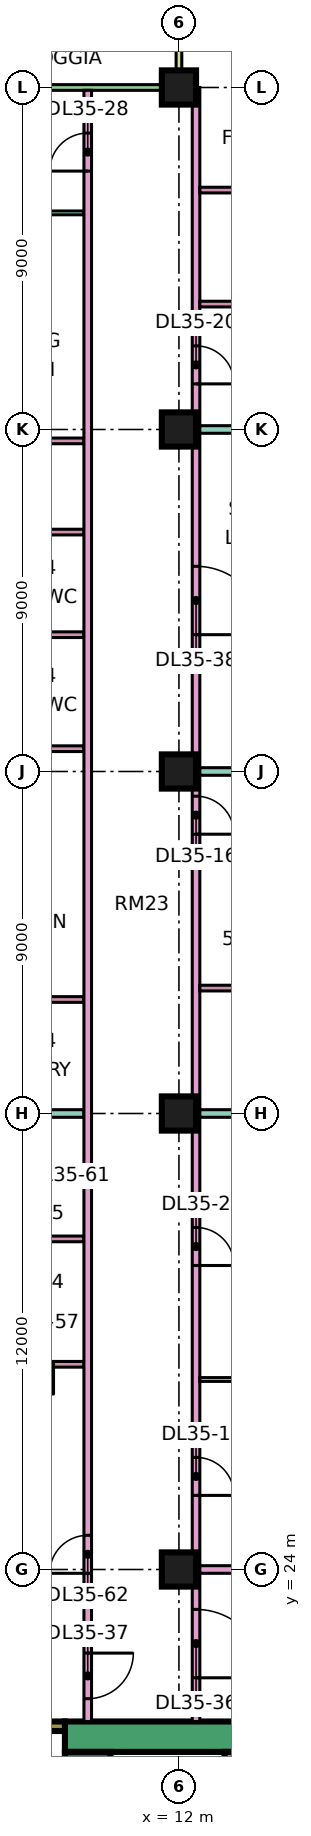
"""IFC4 building model, lengths in metres.
Left out: names, types, materials, properties, quantities, classifications, styles, units other than length and angle.
Written with IfcOpenShell. Run it as: python <this file> out.ifc"""

import sys

from ifc_helpers import new_model, si_unit, direction, frame, frame_2d, origin, origin_2d, place, context, subcontext, project, spatial, rectangle, extrude, element, fill, save


model = new_model("IFC4")
c1 = context("Model", 3, precision=1e-05, world=origin(), true_north=direction((0.0, 1.0)))
c2 = subcontext(c1, "Body", "Model", "MODEL_VIEW")
j1 = project(units=[si_unit("LENGTHUNIT", "METRE"), si_unit("PLANEANGLEUNIT", "RADIAN")], contexts=[c1])
p1 = place(None, origin())
s1 = spatial("IfcSite", under=j1, at=p1, CompositionType="ELEMENT")
p2 = place(p1, origin())
s2 = spatial("IfcBuilding", under=s1, at=p2, CompositionType="ELEMENT")
p3 = place(p2, frame((0.0, 0.0, 157.4)))
s3 = spatial("IfcBuildingStorey", under=s2, at=p3, CompositionType="ELEMENT", Elevation=157.4)
for number, where, z_axis, x_axis in (
    (1, (12.0, 24.0, 0.0), (0.0, 0.0, 1.0), (1.0, 0.0, 0.0)),
    (2, (12.0, 36.0, 0.0), (0.0, 0.0, 1.0), (1.0, 0.0, 0.0)),
    (3, (12.0, 45.0, 0.0), (0.0, 0.0, 1.0), (1.0, 0.0, 0.0)),
    (4, (12.0, 54.0, 0.0), (0.0, 0.0, 1.0), (1.0, 0.0, 0.0)),
    (5, (12.0, 63.0, 0.0), (0.0, 0.0, 1.0), (1.0, 0.0, 0.0)),
):
    element("IfcColumn", number, at=place(p3, frame(where, z_axis=z_axis, x_axis=x_axis)), inside=s3, PredefinedType="COLUMN", context=c2, shape_type="SweptSolid", body=[
        extrude(rectangle(XDim=0.9, YDim=0.9, at=origin_2d()), origin(), (0.0, 0.0, 1.0), 3.75),
    ])
p4 = place(p3, frame((9.0, 19.6, 0.0), z_axis=(0.0, 0.0, 1.0), x_axis=(1.0, 0.0, 0.0)))
e6 = element("IfcWall", 6, at=p4, inside=s3, PredefinedType="SHEAR", context=c2, shape_type="SweptSolid", body=[
    extrude(rectangle(XDim=25.0, YDim=0.8, at=frame_2d((12.5, 0.0))), origin(), (0.0, 0.0, 1.0), 3.75),
])
p5 = place(p4, frame((19.1, 0.0, 0.0)))
e7 = element("IfcOpeningElement", 7, at=p5, cuts=e6, PredefinedType="OPENING", context=c2, shape_type="SweptSolid", body=[
    extrude(rectangle(XDim=1.8, YDim=2.4, at=frame_2d((0.9, 1.2))), frame((0.0, 0.41, 0.0), z_axis=(0.0, -1.0, 0.0), x_axis=(1.0, 0.0, 0.0)), (0.0, 0.0, 1.0), 0.82),
])
p6 = place(p3, frame((9.6, 7.8, 0.0), z_axis=(0.0, 0.0, 1.0), x_axis=(0.0, 1.0, 0.0)))
e8 = element("IfcWall", 8, at=p6, inside=s3, PredefinedType="SHEAR", context=c2, shape_type="SweptSolid", body=[
    extrude(rectangle(XDim=11.4, YDim=1.2, at=frame_2d((5.7, 0.0))), origin(), (0.0, 0.0, 1.0), 3.75),
])
p7 = place(p6, frame((4.075, 0.0, 0.0)))
e9 = element("IfcOpeningElement", 9, at=p7, cuts=e8, PredefinedType="OPENING", context=c2, shape_type="SweptSolid", body=[
    extrude(rectangle(XDim=1.1, YDim=2.2, at=frame_2d((0.55, 1.1))), frame((0.0, 0.61, 0.0), z_axis=(0.0, -1.0, 0.0), x_axis=(1.0, 0.0, 0.0)), (0.0, 0.0, 1.0), 1.22),
])
p8 = place(p6, frame((6.575, 0.0, 0.0)))
e10 = element("IfcOpeningElement", 10, at=p8, cuts=e8, PredefinedType="OPENING", context=c2, shape_type="SweptSolid", body=[
    extrude(rectangle(XDim=1.1, YDim=2.2, at=frame_2d((0.55, 1.1))), frame((0.0, 0.61, 0.0), z_axis=(0.0, -1.0, 0.0), x_axis=(1.0, 0.0, 0.0)), (0.0, 0.0, 1.0), 1.22),
])
p9 = place(p6, frame((9.4, 0.0, 0.0)))
e11 = element("IfcOpeningElement", 11, at=p9, cuts=e8, PredefinedType="OPENING", context=c2, shape_type="SweptSolid", body=[
    extrude(rectangle(XDim=1.1, YDim=2.2, at=frame_2d((0.55, 1.1))), frame((0.0, 0.61, 0.0), z_axis=(0.0, -1.0, 0.0), x_axis=(1.0, 0.0, 0.0)), (0.0, 0.0, 1.0), 1.22),
])
p10 = place(p6, frame((1.75, 0.0, 0.0)))
e12 = element("IfcOpeningElement", 12, at=p10, cuts=e8, PredefinedType="OPENING", context=c2, shape_type="SweptSolid", body=[
    extrude(rectangle(XDim=0.9, YDim=2.1, at=frame_2d((0.45, 1.05))), frame((0.0, 0.61, 0.0), z_axis=(0.0, -1.0, 0.0), x_axis=(1.0, 0.0, 0.0)), (0.0, 0.0, 1.0), 1.22),
])
p11 = place(p3, frame((13.325, 7.8, 0.0), z_axis=(0.0, 0.0, 1.0), x_axis=(0.0, 1.0, 0.0)))
e13 = element("IfcWall", 13, at=p11, inside=s3, PredefinedType="SHEAR", context=c2, shape_type="SweptSolid", body=[
    extrude(rectangle(XDim=11.4, YDim=0.25, at=frame_2d((5.7, 0.0))), origin(), (0.0, 0.0, 1.0), 3.75),
])
p12 = place(p3, frame((2.1, 19.875, 0.0), z_axis=(0.0, 0.0, 1.0), x_axis=(1.0, 0.0, 0.0)))
e14 = element("IfcWall", 14, at=p12, inside=s3, PredefinedType="SHEAR", context=c2, shape_type="SweptSolid", body=[
    extrude(rectangle(XDim=6.9, YDim=0.25, at=frame_2d((3.45, 0.0))), origin(), (0.0, 0.0, 1.0), 3.75),
])
p13 = place(p12, frame((1.175, 0.0, 0.0)))
e15 = element("IfcOpeningElement", 15, at=p13, cuts=e14, PredefinedType="OPENING", context=c2, shape_type="SweptSolid", body=[
    extrude(rectangle(XDim=1.1, YDim=2.2, at=frame_2d((0.55, 1.1))), frame((0.0, 0.135, 0.0), z_axis=(0.0, -1.0, 0.0), x_axis=(1.0, 0.0, 0.0)), (0.0, 0.0, 1.0), 0.27),
])
p14 = place(p12, frame((4.6, 0.0, 0.0)))
e16 = element("IfcOpeningElement", 16, at=p14, cuts=e14, PredefinedType="OPENING", context=c2, shape_type="SweptSolid", body=[
    extrude(rectangle(XDim=1.2, YDim=2.2, at=frame_2d((0.6, 1.1))), frame((0.0, 0.135, 0.0), z_axis=(0.0, -1.0, 0.0), x_axis=(1.0, 0.0, 0.0)), (0.0, 0.0, 1.0), 0.27),
])
p15 = place(p3, frame((11.925, 63.0, 0.0), z_axis=(0.0, 0.0, 1.0), x_axis=(-1.0, 0.0, 0.0)))
e17 = element("IfcWall", 17, at=p15, inside=s3, PredefinedType="SOLIDWALL", context=c2, shape_type="SweptSolid", body=[
    extrude(rectangle(XDim=10.35, YDim=0.15, at=frame_2d((5.175, 0.0))), origin(), (0.0, 0.0, 1.0), 3.35),
])
p16 = place(p15, frame((7.688, 0.0, 0.0)))
e18 = element("IfcOpeningElement", 18, at=p16, cuts=e17, PredefinedType="OPENING", context=c2, shape_type="SweptSolid", body=[
    extrude(rectangle(XDim=1.8, YDim=2.4, at=frame_2d((0.9, 1.2))), frame((0.0, 0.085, 0.0), z_axis=(0.0, -1.0, 0.0), x_axis=(1.0, 0.0, 0.0)), (0.0, 0.0, 1.0), 0.17),
])
p17 = place(p3, frame((12.0, 64.5, 0.0), z_axis=(0.0, 0.0, 1.0), x_axis=(0.0, -1.0, 0.0)))
e19 = element("IfcWall", 19, at=p17, inside=s3, PredefinedType="SOLIDWALL", context=c2, shape_type="SweptSolid", body=[
    extrude(rectangle(XDim=1.5, YDim=0.15, at=frame_2d((0.75, 0.0))), origin(), (0.0, 0.0, 1.0), 3.35),
])
p18 = place(p3, frame((-1.35, 22.4, 0.0), z_axis=(0.0, 0.0, 1.0), x_axis=(1.0, 0.0, 0.0)))
e20 = element("IfcWall", 20, at=p18, inside=s3, PredefinedType="PARTITIONING", context=c2, shape_type="SweptSolid", body=[
    extrude(rectangle(XDim=10.85, YDim=0.2, at=frame_2d((5.425, 0.0))), origin(), (0.0, 0.0, 1.0), 3.35),
])
p19 = place(p3, frame((0.0, 36.0, 0.0), z_axis=(0.0, 0.0, 1.0), x_axis=(1.0, 0.0, 0.0)))
e21 = element("IfcWall", 21, at=p19, inside=s3, PredefinedType="PARTITIONING", context=c2, shape_type="SweptSolid", body=[
    extrude(rectangle(XDim=9.5, YDim=0.2, at=frame_2d((4.75, 0.0))), origin(), (0.0, 0.0, 1.0), 3.35),
])
for number, where, z_axis, x_axis in (
    (22, (6.375, 39.0, 0.0), (0.0, 0.0, 1.0), (1.0, 0.0, 0.0)),
    (23, (6.375, 45.6, 0.0), (0.0, 0.0, 1.0), (1.0, 0.0, 0.0)),
    (24, (6.375, 48.6, 0.0), (0.0, 0.0, 1.0), (1.0, 0.0, 0.0)),
    (25, (6.375, 51.3, 0.0), (0.0, 0.0, 1.0), (1.0, 0.0, 0.0)),
    (26, (6.375, 53.7, 0.0), (0.0, 0.0, 1.0), (1.0, 0.0, 0.0)),
):
    element("IfcWall", number, at=place(p3, frame(where, z_axis=z_axis, x_axis=x_axis)), inside=s3, PredefinedType="PARTITIONING", context=c2, shape_type="SweptSolid", body=[
        extrude(rectangle(XDim=3.125, YDim=0.15, at=frame_2d((1.562, 0.0))), origin(), (0.0, 0.0, 1.0), 3.35),
    ])
p20 = place(p3, frame((6.375, 59.7, 0.0), z_axis=(0.0, 0.0, 1.0), x_axis=(1.0, 0.0, 0.0)))
e27 = element("IfcWall", 27, at=p20, inside=s3, PredefinedType="PARTITIONING", context=c2, shape_type="SweptSolid", body=[
    extrude(rectangle(XDim=3.125, YDim=0.1, at=frame_2d((1.562, 0.0))), origin(), (0.0, 0.0, 1.0), 3.35),
])
p21 = place(p20, frame((1.125, 0.0, 0.0)))
e28 = element("IfcOpeningElement", 28, at=p21, cuts=e27, PredefinedType="OPENING", context=c2, shape_type="SweptSolid", body=[
    extrude(rectangle(XDim=0.9, YDim=2.1, at=frame_2d((0.45, 1.05))), frame((0.0, 0.06, 0.0), z_axis=(0.0, -1.0, 0.0), x_axis=(1.0, 0.0, 0.0)), (0.0, 0.0, 1.0), 0.12),
])
p22 = place(p3, frame((6.975, 29.4, 0.0), z_axis=(0.0, 0.0, 1.0), x_axis=(1.0, 0.0, 0.0)))
e29 = element("IfcWall", 29, at=p22, inside=s3, PredefinedType="PARTITIONING", context=c2, shape_type="SweptSolid", body=[
    extrude(rectangle(XDim=2.525, YDim=0.15, at=frame_2d((1.262, 0.0))), origin(), (0.0, 0.0, 1.0), 3.35),
])
p23 = place(p22, frame((0.925, 0.0, 0.0)))
e30 = element("IfcOpeningElement", 30, at=p23, cuts=e29, PredefinedType="OPENING", context=c2, shape_type="SweptSolid", body=[
    extrude(rectangle(XDim=0.8, YDim=2.1, at=frame_2d((0.4, 1.05))), frame((0.0, 0.085, 0.0), z_axis=(0.0, -1.0, 0.0), x_axis=(1.0, 0.0, 0.0)), (0.0, 0.0, 1.0), 0.17),
])
p24 = place(p3, frame((6.975, 32.7, 0.0), z_axis=(0.0, 0.0, 1.0), x_axis=(1.0, 0.0, 0.0)))
e31 = element("IfcWall", 31, at=p24, inside=s3, PredefinedType="PARTITIONING", context=c2, shape_type="SweptSolid", body=[
    extrude(rectangle(XDim=2.525, YDim=0.15, at=frame_2d((1.262, 0.0))), origin(), (0.0, 0.0, 1.0), 3.35),
])
p25 = place(p3, frame((9.6, 20.0, 0.0), z_axis=(0.0, 0.0, 1.0), x_axis=(0.0, 1.0, 0.0)))
e32 = element("IfcWall", 32, at=p25, inside=s3, PredefinedType="PARTITIONING", context=c2, shape_type="SweptSolid", body=[
    extrude(rectangle(XDim=42.926, YDim=0.2, at=frame_2d((21.463, 0.0))), origin(), (0.0, 0.0, 1.0), 3.35),
])
p26 = place(p25, frame((40.8, 0.0, 0.0)))
e33 = element("IfcOpeningElement", 33, at=p26, cuts=e32, PredefinedType="OPENING", context=c2, shape_type="SweptSolid", body=[
    extrude(rectangle(XDim=1.0, YDim=2.1, at=frame_2d((0.5, 1.05))), frame((0.0, 0.11, 0.0), z_axis=(0.0, -1.0, 0.0), x_axis=(1.0, 0.0, 0.0)), (0.0, 0.0, 1.0), 0.22),
])
p27 = place(p25, frame((0.6, 0.0, 0.0)))
e34 = element("IfcOpeningElement", 34, at=p27, cuts=e32, PredefinedType="OPENING", context=c2, shape_type="SweptSolid", body=[
    extrude(rectangle(XDim=1.2, YDim=2.1, at=frame_2d((0.6, 1.05))), frame((0.0, 0.11, 0.0), z_axis=(0.0, -1.0, 0.0), x_axis=(1.0, 0.0, 0.0)), (0.0, 0.0, 1.0), 0.22),
])
p28 = place(p25, frame((3.9, 0.0, 0.0)))
e35 = element("IfcOpeningElement", 35, at=p28, cuts=e32, PredefinedType="OPENING", context=c2, shape_type="SweptSolid", body=[
    extrude(rectangle(XDim=1.0, YDim=2.1, at=frame_2d((0.5, 1.05))), frame((0.0, 0.11, 0.0), z_axis=(0.0, -1.0, 0.0), x_axis=(1.0, 0.0, 0.0)), (0.0, 0.0, 1.0), 0.22),
])
p29 = place(p3, frame((12.45, 20.0, 0.0), z_axis=(0.0, 0.0, 1.0), x_axis=(0.0, 1.0, 0.0)))
e36 = element("IfcWall", 36, at=p29, inside=s3, PredefinedType="PARTITIONING", context=c2, shape_type="SweptSolid", body=[
    extrude(rectangle(XDim=43.0, YDim=0.2, at=frame_2d((21.5, 0.0))), origin(), (0.0, 0.0, 1.0), 3.35),
])
p30 = place(p29, frame((5.95, 0.0, 0.0)))
e37 = element("IfcOpeningElement", 37, at=p30, cuts=e36, PredefinedType="OPENING", context=c2, shape_type="SweptSolid", body=[
    extrude(rectangle(XDim=1.0, YDim=2.1, at=frame_2d((0.5, 1.05))), frame((0.0, 0.11, 0.0), z_axis=(0.0, -1.0, 0.0), x_axis=(1.0, 0.0, 0.0)), (0.0, 0.0, 1.0), 0.22),
])
p31 = place(p29, frame((12.0, 0.0, 0.0)))
e38 = element("IfcOpeningElement", 38, at=p31, cuts=e36, PredefinedType="OPENING", context=c2, shape_type="SweptSolid", body=[
    extrude(rectangle(XDim=1.0, YDim=2.1, at=frame_2d((0.5, 1.05))), frame((0.0, 0.11, 0.0), z_axis=(0.0, -1.0, 0.0), x_axis=(1.0, 0.0, 0.0)), (0.0, 0.0, 1.0), 0.22),
])
p32 = place(p29, frame((23.35, 0.0, 0.0)))
e39 = element("IfcOpeningElement", 39, at=p32, cuts=e36, PredefinedType="OPENING", context=c2, shape_type="SweptSolid", body=[
    extrude(rectangle(XDim=1.0, YDim=2.1, at=frame_2d((0.5, 1.05))), frame((0.0, 0.11, 0.0), z_axis=(0.0, -1.0, 0.0), x_axis=(1.0, 0.0, 0.0)), (0.0, 0.0, 1.0), 0.22),
])
p33 = place(p29, frame((35.2, 0.0, 0.0)))
e40 = element("IfcOpeningElement", 40, at=p33, cuts=e36, PredefinedType="OPENING", context=c2, shape_type="SweptSolid", body=[
    extrude(rectangle(XDim=1.0, YDim=2.1, at=frame_2d((0.5, 1.05))), frame((0.0, 0.11, 0.0), z_axis=(0.0, -1.0, 0.0), x_axis=(1.0, 0.0, 0.0)), (0.0, 0.0, 1.0), 0.22),
])
p34 = place(p29, frame((1.15, 0.0, 0.0)))
e41 = element("IfcOpeningElement", 41, at=p34, cuts=e36, PredefinedType="OPENING", context=c2, shape_type="SweptSolid", body=[
    extrude(rectangle(XDim=1.8, YDim=2.1, at=frame_2d((0.9, 1.05))), frame((0.0, 0.11, 0.0), z_axis=(0.0, -1.0, 0.0), x_axis=(1.0, 0.0, 0.0)), (0.0, 0.0, 1.0), 0.22),
])
p35 = place(p29, frame((28.6, 0.0, 0.0)))
e42 = element("IfcOpeningElement", 42, at=p35, cuts=e36, PredefinedType="OPENING", context=c2, shape_type="SweptSolid", body=[
    extrude(rectangle(XDim=1.8, YDim=2.1, at=frame_2d((0.9, 1.05))), frame((0.0, 0.11, 0.0), z_axis=(0.0, -1.0, 0.0), x_axis=(1.0, 0.0, 0.0)), (0.0, 0.0, 1.0), 0.22),
])
p36 = place(p3, frame((12.55, 24.0, 0.0), z_axis=(0.0, 0.0, 1.0), x_axis=(1.0, 0.0, 0.0)))
e43 = element("IfcWall", 43, at=p36, inside=s3, PredefinedType="PARTITIONING", context=c2, shape_type="SweptSolid", body=[
    extrude(rectangle(XDim=8.95, YDim=0.2, at=frame_2d((4.475, 0.0))), origin(), (0.0, 0.0, 1.0), 3.35),
])
p37 = place(p3, frame((12.55, 29.0, 0.0), z_axis=(0.0, 0.0, 1.0), x_axis=(1.0, 0.0, 0.0)))
e44 = element("IfcWall", 44, at=p37, inside=s3, PredefinedType="PARTITIONING", context=c2, shape_type="SweptSolid", body=[
    extrude(rectangle(XDim=8.95, YDim=0.1, at=frame_2d((4.475, 0.0))), origin(), (0.0, 0.0, 1.0), 3.35),
])
p38 = place(p3, frame((12.55, 36.0, 0.0), z_axis=(0.0, 0.0, 1.0), x_axis=(1.0, 0.0, 0.0)))
e45 = element("IfcWall", 45, at=p38, inside=s3, PredefinedType="PARTITIONING", context=c2, shape_type="SweptSolid", body=[
    extrude(rectangle(XDim=11.45, YDim=0.2, at=frame_2d((5.725, 0.0))), origin(), (0.0, 0.0, 1.0), 3.35),
])
p39 = place(p3, frame((12.55, 39.3, 0.0), z_axis=(0.0, 0.0, 1.0), x_axis=(1.0, 0.0, 0.0)))
e46 = element("IfcWall", 46, at=p39, inside=s3, PredefinedType="PARTITIONING", context=c2, shape_type="SweptSolid", body=[
    extrude(rectangle(XDim=4.625, YDim=0.15, at=frame_2d((2.312, 0.0))), origin(), (0.0, 0.0, 1.0), 3.35),
])
p40 = place(p3, frame((12.55, 42.6, 0.0), z_axis=(0.0, 0.0, 1.0), x_axis=(1.0, 0.0, 0.0)))
e47 = element("IfcWall", 47, at=p40, inside=s3, PredefinedType="PARTITIONING", context=c2, shape_type="SweptSolid", body=[
    extrude(rectangle(XDim=4.625, YDim=0.15, at=frame_2d((2.312, 0.0))), origin(), (0.0, 0.0, 1.0), 3.35),
])
p41 = place(p40, frame((1.85, 0.0, 0.0)))
e48 = element("IfcOpeningElement", 48, at=p41, cuts=e47, PredefinedType="OPENING", context=c2, shape_type="SweptSolid", body=[
    extrude(rectangle(XDim=0.8, YDim=2.1, at=frame_2d((0.4, 1.05))), frame((0.0, 0.085, 0.0), z_axis=(0.0, -1.0, 0.0), x_axis=(1.0, 0.0, 0.0)), (0.0, 0.0, 1.0), 0.17),
])
p42 = place(p3, frame((12.55, 45.0, 0.0), z_axis=(0.0, 0.0, 1.0), x_axis=(1.0, 0.0, 0.0)))
e49 = element("IfcWall", 49, at=p42, inside=s3, PredefinedType="PARTITIONING", context=c2, shape_type="SweptSolid", body=[
    extrude(rectangle(XDim=11.45, YDim=0.2, at=frame_2d((5.725, 0.0))), origin(), (0.0, 0.0, 1.0), 3.35),
])
p43 = place(p3, frame((12.55, 54.0, 0.0), z_axis=(0.0, 0.0, 1.0), x_axis=(1.0, 0.0, 0.0)))
e50 = element("IfcWall", 50, at=p43, inside=s3, PredefinedType="PARTITIONING", context=c2, shape_type="SweptSolid", body=[
    extrude(rectangle(XDim=11.376, YDim=0.2, at=frame_2d((5.688, 0.0))), origin(), (0.0, 0.0, 1.0), 3.35),
])
for number, where, z_axis, x_axis in (
    (51, (12.55, 57.3, 0.0), (0.0, 0.0, 1.0), (1.0, 0.0, 0.0)),
    (52, (12.55, 60.3, 0.0), (0.0, 0.0, 1.0), (1.0, 0.0, 0.0)),
):
    element("IfcWall", number, at=place(p3, frame(where, z_axis=z_axis, x_axis=x_axis)), inside=s3, PredefinedType="PARTITIONING", context=c2, shape_type="SweptSolid", body=[
        extrude(rectangle(XDim=5.225, YDim=0.15, at=frame_2d((2.612, 0.0))), origin(), (0.0, 0.0, 1.0), 3.35),
    ])
p44 = place(p30, frame((1.0, 0.0, 0.0), z_axis=(0.0, 0.0, 1.0), x_axis=(-1.0, 0.0, 0.0)))
e53 = element("IfcDoor", 53, at=p44, inside=s3, OperationType="SINGLE_SWING_LEFT", PredefinedType="DOOR", context=c2, shape_type="SweptSolid", body=[
    extrude(rectangle(XDim=1.0, YDim=2.1, at=frame_2d((0.5, 1.05))), frame((0.0, 0.025, 0.0), z_axis=(0.0, -1.0, 0.0), x_axis=(1.0, 0.0, 0.0)), (0.0, 0.0, 1.0), 0.05),
])
fill(e37, e53)
p45 = place(p31, frame((1.0, 0.0, 0.0), z_axis=(0.0, 0.0, 1.0), x_axis=(-1.0, 0.0, 0.0)))
e54 = element("IfcDoor", 54, at=p45, inside=s3, OperationType="SINGLE_SWING_LEFT", PredefinedType="DOOR", context=c2, shape_type="SweptSolid", body=[
    extrude(rectangle(XDim=1.0, YDim=2.1, at=frame_2d((0.5, 1.05))), frame((0.0, 0.025, 0.0), z_axis=(0.0, -1.0, 0.0), x_axis=(1.0, 0.0, 0.0)), (0.0, 0.0, 1.0), 0.05),
])
fill(e38, e54)
p46 = place(p32, frame((1.0, 0.0, 0.0), z_axis=(0.0, 0.0, 1.0), x_axis=(-1.0, 0.0, 0.0)))
e55 = element("IfcDoor", 55, at=p46, inside=s3, OperationType="SINGLE_SWING_LEFT", PredefinedType="DOOR", context=c2, shape_type="SweptSolid", body=[
    extrude(rectangle(XDim=1.0, YDim=2.1, at=frame_2d((0.5, 1.05))), frame((0.0, 0.025, 0.0), z_axis=(0.0, -1.0, 0.0), x_axis=(1.0, 0.0, 0.0)), (0.0, 0.0, 1.0), 0.05),
])
fill(e39, e55)
p47 = place(p33, frame((1.0, 0.0, 0.0), z_axis=(0.0, 0.0, 1.0), x_axis=(-1.0, 0.0, 0.0)))
e56 = element("IfcDoor", 56, at=p47, inside=s3, OperationType="SINGLE_SWING_LEFT", PredefinedType="DOOR", context=c2, shape_type="SweptSolid", body=[
    extrude(rectangle(XDim=1.0, YDim=2.1, at=frame_2d((0.5, 1.05))), frame((0.0, 0.025, 0.0), z_axis=(0.0, -1.0, 0.0), x_axis=(1.0, 0.0, 0.0)), (0.0, 0.0, 1.0), 0.05),
])
fill(e40, e56)
p48 = place(p26, origin())
e57 = element("IfcDoor", 57, at=p48, inside=s3, OperationType="SINGLE_SWING_LEFT", PredefinedType="DOOR", context=c2, shape_type="SweptSolid", body=[
    extrude(rectangle(XDim=1.0, YDim=2.1, at=frame_2d((0.5, 1.05))), frame((0.0, 0.025, 0.0), z_axis=(0.0, -1.0, 0.0), x_axis=(1.0, 0.0, 0.0)), (0.0, 0.0, 1.0), 0.05),
])
fill(e33, e57)
p49 = place(p34, frame((1.8, 0.0, 0.0), z_axis=(0.0, 0.0, 1.0), x_axis=(-1.0, 0.0, 0.0)))
e58 = element("IfcDoor", 58, at=p49, inside=s3, OperationType="DOUBLE_DOOR_SINGLE_SWING", PredefinedType="DOOR", context=c2, shape_type="SweptSolid", body=[
    extrude(rectangle(XDim=1.8, YDim=2.1, at=frame_2d((0.9, 1.05))), frame((0.0, 0.025, 0.0), z_axis=(0.0, -1.0, 0.0), x_axis=(1.0, 0.0, 0.0)), (0.0, 0.0, 1.0), 0.05),
])
fill(e41, e58)
p50 = place(p27, origin())
e59 = element("IfcDoor", 59, at=p50, inside=s3, OperationType="SINGLE_SWING_RIGHT", PredefinedType="DOOR", context=c2, shape_type="SweptSolid", body=[
    extrude(rectangle(XDim=1.2, YDim=2.1, at=frame_2d((0.6, 1.05))), frame((0.0, 0.025, 0.0), z_axis=(0.0, -1.0, 0.0), x_axis=(1.0, 0.0, 0.0)), (0.0, 0.0, 1.0), 0.05),
])
fill(e34, e59)
p51 = place(p35, frame((1.8, 0.0, 0.0), z_axis=(0.0, 0.0, 1.0), x_axis=(-1.0, 0.0, 0.0)))
e60 = element("IfcDoor", 60, at=p51, inside=s3, OperationType="DOUBLE_DOOR_SINGLE_SWING", PredefinedType="DOOR", context=c2, shape_type="SweptSolid", body=[
    extrude(rectangle(XDim=1.8, YDim=2.1, at=frame_2d((0.9, 1.05))), frame((0.0, 0.025, 0.0), z_axis=(0.0, -1.0, 0.0), x_axis=(1.0, 0.0, 0.0)), (0.0, 0.0, 1.0), 0.05),
])
fill(e42, e60)
p52 = place(p23, origin())
e61 = element("IfcDoor", 61, at=p52, inside=s3, OperationType="SINGLE_SWING_RIGHT", PredefinedType="DOOR", context=c2, shape_type="SweptSolid", body=[
    extrude(rectangle(XDim=0.8, YDim=2.1, at=frame_2d((0.4, 1.05))), frame((0.0, 0.025, 0.0), z_axis=(0.0, -1.0, 0.0), x_axis=(1.0, 0.0, 0.0)), (0.0, 0.0, 1.0), 0.05),
])
fill(e30, e61)
p53 = place(p28, origin())
e62 = element("IfcDoor", 62, at=p53, inside=s3, OperationType="SINGLE_SWING_LEFT", PredefinedType="DOOR", context=c2, shape_type="SweptSolid", body=[
    extrude(rectangle(XDim=1.0, YDim=2.1, at=frame_2d((0.5, 1.05))), frame((0.0, 0.025, 0.0), z_axis=(0.0, -1.0, 0.0), x_axis=(1.0, 0.0, 0.0)), (0.0, 0.0, 1.0), 0.05),
])
fill(e35, e62)
save(model, sys.argv[1])
